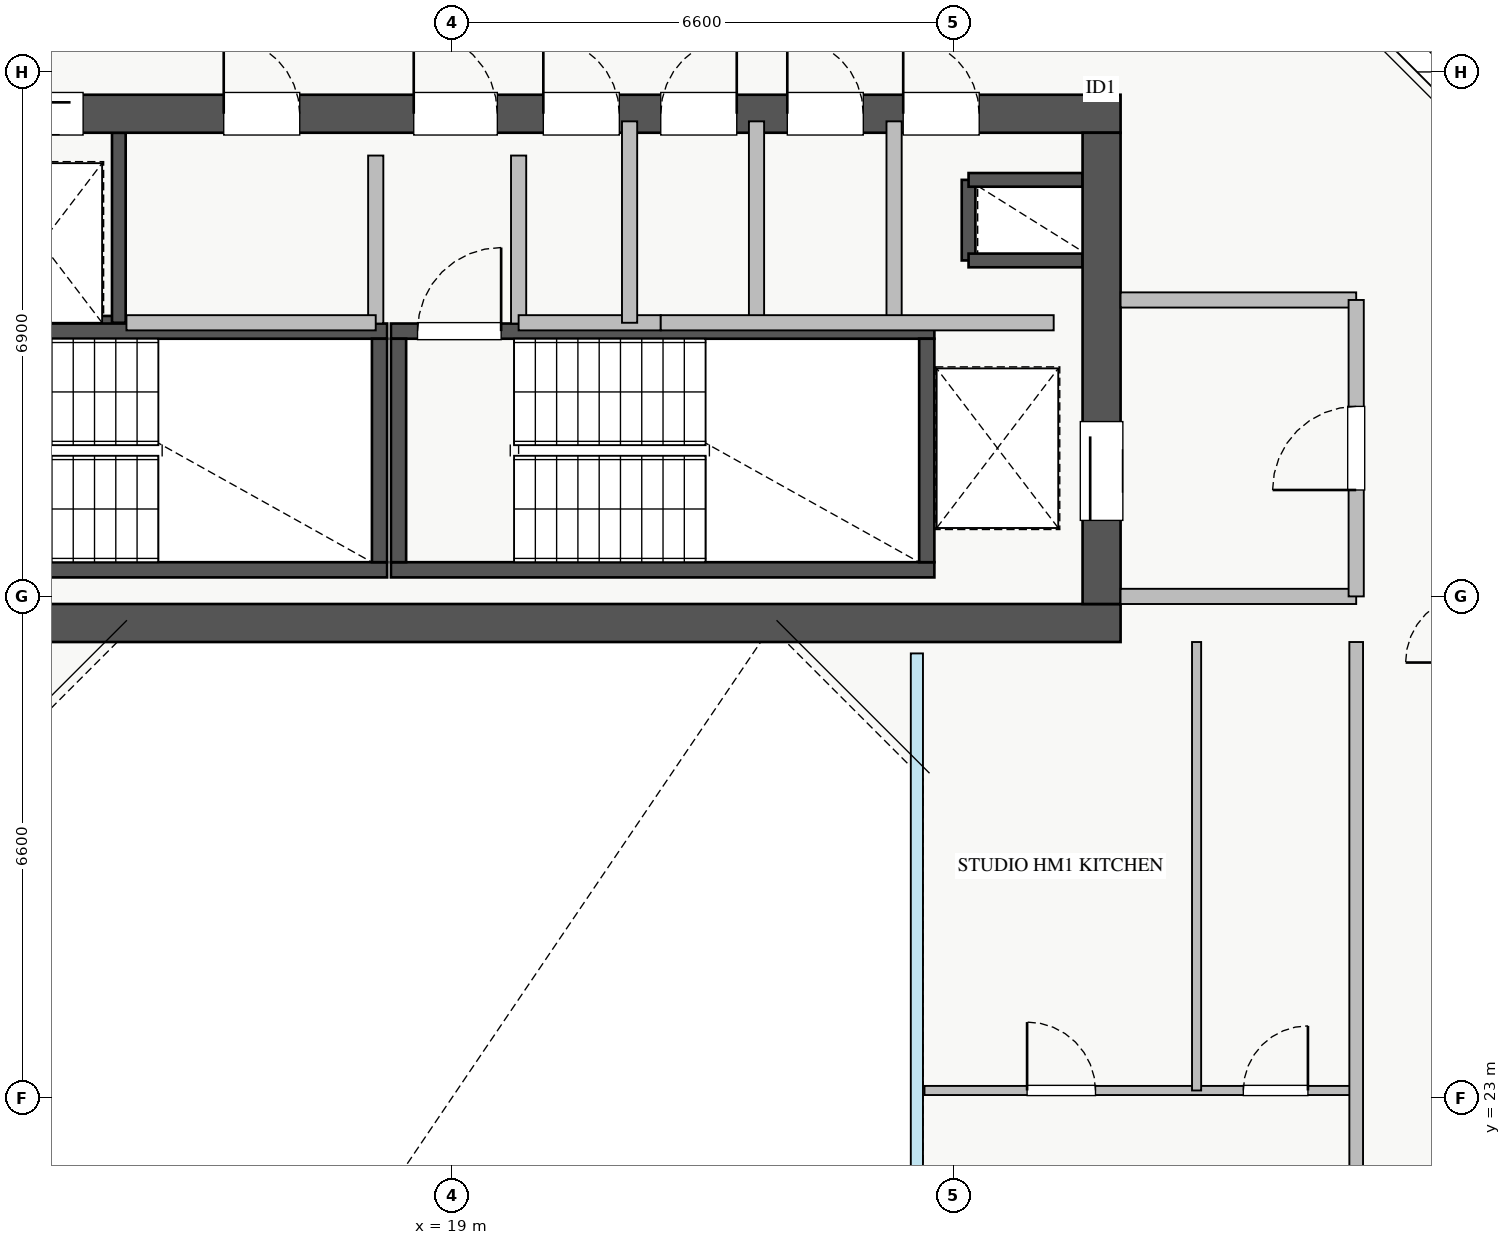
"""IFC4 building model, lengths in metres.
Left out: names, types, materials, properties, quantities, classifications, styles, units other than length and angle.
Written with IfcOpenShell. Run it as: python <this file> out.ifc"""

import sys

from ifc_helpers import new_model, si_unit, direction, frame, frame_2d, origin, place, context, subcontext, project, spatial, rectangle, extrude, source, transform, mapped, element, fill, save


model = new_model("IFC4")
c1 = context("Model", 3, precision=1e-05, world=origin(), true_north=direction((0.0, 1.0)))
c2 = subcontext(c1, "Body", "Model", "MODEL_VIEW")
j1 = project(units=[si_unit("LENGTHUNIT", "METRE"), si_unit("PLANEANGLEUNIT", "RADIAN")], contexts=[c1])
p1 = place(None, origin())
s1 = spatial("IfcSite", under=j1, at=p1, CompositionType="ELEMENT")
p2 = place(p1, origin())
s2 = spatial("IfcBuilding", under=s1, at=p2, CompositionType="ELEMENT")
p3 = place(p2, frame((0.0, 0.0, 193.75)))
s3 = spatial("IfcBuildingStorey", under=s2, at=p3, CompositionType="ELEMENT", Elevation=193.75)
p4 = place(p3, frame((12.68, 33.2, 0.0), z_axis=(0.0, 0.0, 1.0), x_axis=(1.0, 0.0, 0.0)))
e1 = element("IfcWall", 1, at=p4, inside=s3, PredefinedType="SHEAR", context=c2, shape_type="SweptSolid", body=[
    extrude(rectangle(XDim=1.94, YDim=0.18, at=frame_2d((0.97, 0.0))), origin(), (0.0, 0.0, 1.0), 3.07),
])
p5 = place(p3, frame((14.62, 33.2, 0.0), z_axis=(0.0, 0.0, 1.0), x_axis=(0.0, 1.0, 0.0)))
e2 = element("IfcWall", 2, at=p5, inside=s3, PredefinedType="SHEAR", context=c2, shape_type="SweptSolid", body=[
    extrude(rectangle(XDim=2.5, YDim=0.18, at=frame_2d((1.25, 0.0))), origin(), (0.0, 0.0, 1.0), 3.07),
])
p6 = place(p3, frame((25.8, 34.02, 0.0), z_axis=(0.0, 0.0, 1.0), x_axis=(0.0, 1.0, 0.0)))
e3 = element("IfcWall", 3, at=p6, inside=s3, PredefinedType="SHEAR", context=c2, shape_type="SweptSolid", body=[
    extrude(rectangle(XDim=1.06, YDim=0.18, at=frame_2d((0.53, 0.0))), origin(), (0.0, 0.0, 1.0), 3.07),
])
for number, where, z_axis, x_axis in (
    (4, (25.8, 35.08, 0.0), (0.0, 0.0, 1.0), (1.0, 0.0, 0.0)),
    (5, (25.8, 34.02, 0.0), (0.0, 0.0, 1.0), (1.0, 0.0, 0.0)),
):
    element("IfcWall", number, at=place(p3, frame(where, z_axis=z_axis, x_axis=x_axis)), inside=s3, PredefinedType="SHEAR", context=c2, shape_type="SweptSolid", body=[
        extrude(rectangle(XDim=1.5, YDim=0.18, at=frame_2d((0.75, 0.0))), origin(), (0.0, 0.0, 1.0), 3.07),
    ])
p7 = place(p3, frame((10.7, 29.95, 0.0), z_axis=(0.0, 0.0, 1.0), x_axis=(1.0, 0.0, 0.0)))
e6 = element("IfcWall", 6, at=p7, inside=s3, PredefinedType="SHEAR", context=c2, shape_type="SweptSolid", body=[
    extrude(rectangle(XDim=7.45, YDim=0.2, at=frame_2d((3.725, 0.0))), origin(), (0.0, 0.0, 1.0), 3.25),
])
p8 = place(p3, frame((10.7, 33.09, 0.0), z_axis=(0.0, 0.0, 1.0), x_axis=(1.0, 0.0, 0.0)))
e7 = element("IfcWall", 7, at=p8, inside=s3, PredefinedType="SHEAR", context=c2, shape_type="SweptSolid", body=[
    extrude(rectangle(XDim=7.45, YDim=0.2, at=frame_2d((3.725, 0.0))), origin(), (0.0, 0.0, 1.0), 3.25),
])
p9 = place(p8, frame((0.35, 0.0, 0.0)))
e8 = element("IfcOpeningElement", 8, at=p9, cuts=e7, PredefinedType="OPENING", context=c2, shape_type="SweptSolid", body=[
    extrude(rectangle(XDim=1.1, YDim=2.05, at=frame_2d((0.55, 1.025))), frame((0.0, 0.11, 0.0), z_axis=(0.0, -1.0, 0.0), x_axis=(1.0, 0.0, 0.0)), (0.0, 0.0, 1.0), 0.22),
])
p10 = place(p3, frame((18.05, 30.05, 0.0), z_axis=(0.0, 0.0, 1.0), x_axis=(0.0, 1.0, 0.0)))
e9 = element("IfcWall", 9, at=p10, inside=s3, PredefinedType="SHEAR", context=c2, shape_type="SweptSolid", body=[
    extrude(rectangle(XDim=2.94, YDim=0.2, at=frame_2d((1.47, 0.0))), origin(), (0.0, 0.0, 1.0), 3.25),
])
p11 = place(p3, frame((18.2, 29.95, 0.0), z_axis=(0.0, 0.0, 1.0), x_axis=(1.0, 0.0, 0.0)))
e10 = element("IfcWall", 10, at=p11, inside=s3, PredefinedType="SHEAR", context=c2, shape_type="SweptSolid", body=[
    extrude(rectangle(XDim=7.15, YDim=0.2, at=frame_2d((3.575, 0.0))), origin(), (0.0, 0.0, 1.0), 3.25),
])
p12 = place(p3, frame((18.2, 33.09, 0.0), z_axis=(0.0, 0.0, 1.0), x_axis=(1.0, 0.0, 0.0)))
e11 = element("IfcWall", 11, at=p12, inside=s3, PredefinedType="SHEAR", context=c2, shape_type="SweptSolid", body=[
    extrude(rectangle(XDim=7.15, YDim=0.2, at=frame_2d((3.575, 0.0))), origin(), (0.0, 0.0, 1.0), 3.25),
])
p13 = place(p12, frame((0.35, 0.0, 0.0)))
e12 = element("IfcOpeningElement", 12, at=p13, cuts=e11, PredefinedType="OPENING", context=c2, shape_type="SweptSolid", body=[
    extrude(rectangle(XDim=1.1, YDim=2.05, at=frame_2d((0.55, 1.025))), frame((0.0, 0.11, 0.0), z_axis=(0.0, -1.0, 0.0), x_axis=(1.0, 0.0, 0.0)), (0.0, 0.0, 1.0), 0.22),
])
for number, where, z_axis, x_axis in (
    (13, (18.3, 30.05, 0.0), (0.0, 0.0, 1.0), (0.0, 1.0, 0.0)),
    (14, (25.25, 30.05, 0.0), (0.0, 0.0, 1.0), (0.0, 1.0, 0.0)),
):
    element("IfcWall", number, at=place(p3, frame(where, z_axis=z_axis, x_axis=x_axis)), inside=s3, PredefinedType="SHEAR", context=c2, shape_type="SweptSolid", body=[
        extrude(rectangle(XDim=2.94, YDim=0.2, at=frame_2d((1.47, 0.0))), origin(), (0.0, 0.0, 1.0), 3.25),
    ])
p14 = place(p3, frame((10.2, 29.25, 0.0), z_axis=(0.0, 0.0, 1.0), x_axis=(1.0, 0.0, 0.0)))
e15 = element("IfcWall", 15, at=p14, inside=s3, PredefinedType="SHEAR", context=c2, shape_type="SweptSolid", body=[
    extrude(rectangle(XDim=17.6, YDim=0.5, at=frame_2d((8.8, 0.0))), origin(), (0.0, 0.0, 1.0), 3.25),
])
p15 = place(p3, frame((10.2, 35.95, 0.0), z_axis=(0.0, 0.0, 1.0), x_axis=(1.0, 0.0, 0.0)))
e16 = element("IfcWall", 16, at=p15, inside=s3, PredefinedType="SHEAR", context=c2, shape_type="SweptSolid", body=[
    extrude(rectangle(XDim=17.6, YDim=0.5, at=frame_2d((8.8, 0.0))), origin(), (0.0, 0.0, 1.0), 3.25),
])
p16 = place(p15, frame((1.15, 0.0, 0.0)))
e17 = element("IfcOpeningElement", 17, at=p16, cuts=e16, PredefinedType="OPENING", context=c2, shape_type="SweptSolid", body=[
    extrude(rectangle(XDim=1.1, YDim=2.05, at=frame_2d((0.55, 1.025))), frame((0.0, 0.26, 0.0), z_axis=(0.0, -1.0, 0.0), x_axis=(1.0, 0.0, 0.0)), (0.0, 0.0, 1.0), 0.52),
])
p17 = place(p15, frame((8.3, 0.0, 0.0)))
e18 = element("IfcOpeningElement", 18, at=p17, cuts=e16, PredefinedType="OPENING", context=c2, shape_type="SweptSolid", body=[
    extrude(rectangle(XDim=1.1, YDim=2.05, at=frame_2d((0.55, 1.025))), frame((0.0, 0.26, 0.0), z_axis=(0.0, -1.0, 0.0), x_axis=(1.0, 0.0, 0.0)), (0.0, 0.0, 1.0), 0.52),
])
p18 = place(p15, frame((2.85, 0.0, 0.0)))
e19 = element("IfcOpeningElement", 19, at=p18, cuts=e16, PredefinedType="OPENING", context=c2, shape_type="SweptSolid", body=[
    extrude(rectangle(XDim=1.1, YDim=2.05, at=frame_2d((0.55, 1.025))), frame((0.0, 0.26, 0.0), z_axis=(0.0, -1.0, 0.0), x_axis=(1.0, 0.0, 0.0)), (0.0, 0.0, 1.0), 0.52),
])
p19 = place(p15, frame((5.8, 0.0, 0.0)))
e20 = element("IfcOpeningElement", 20, at=p19, cuts=e16, PredefinedType="OPENING", context=c2, shape_type="SweptSolid", body=[
    extrude(rectangle(XDim=1.0, YDim=2.05, at=frame_2d((0.5, 1.025))), frame((0.0, 0.26, 0.0), z_axis=(0.0, -1.0, 0.0), x_axis=(1.0, 0.0, 0.0)), (0.0, 0.0, 1.0), 0.52),
])
p20 = place(p15, frame((14.74, 0.0, 0.0)))
e21 = element("IfcOpeningElement", 21, at=p20, cuts=e16, PredefinedType="OPENING", context=c2, shape_type="SweptSolid", body=[
    extrude(rectangle(XDim=1.0, YDim=2.05, at=frame_2d((0.5, 1.025))), frame((0.0, 0.26, 0.0), z_axis=(0.0, -1.0, 0.0), x_axis=(1.0, 0.0, 0.0)), (0.0, 0.0, 1.0), 0.52),
])
p21 = place(p15, frame((10.005, 0.0, 0.0)))
e22 = element("IfcOpeningElement", 22, at=p21, cuts=e16, PredefinedType="OPENING", context=c2, shape_type="SweptSolid", body=[
    extrude(rectangle(XDim=1.0, YDim=2.05, at=frame_2d((0.5, 1.025))), frame((0.0, 0.26, 0.0), z_axis=(0.0, -1.0, 0.0), x_axis=(1.0, 0.0, 0.0)), (0.0, 0.0, 1.0), 0.52),
])
p22 = place(p15, frame((11.55, 0.0, 0.0)))
e23 = element("IfcOpeningElement", 23, at=p22, cuts=e16, PredefinedType="OPENING", context=c2, shape_type="SweptSolid", body=[
    extrude(rectangle(XDim=1.0, YDim=2.05, at=frame_2d((0.5, 1.025))), frame((0.0, 0.26, 0.0), z_axis=(0.0, -1.0, 0.0), x_axis=(1.0, 0.0, 0.0)), (0.0, 0.0, 1.0), 0.52),
])
p23 = place(p15, frame((13.215, 0.0, 0.0)))
e24 = element("IfcOpeningElement", 24, at=p23, cuts=e16, PredefinedType="OPENING", context=c2, shape_type="SweptSolid", body=[
    extrude(rectangle(XDim=1.0, YDim=2.05, at=frame_2d((0.5, 1.025))), frame((0.0, 0.26, 0.0), z_axis=(0.0, -1.0, 0.0), x_axis=(1.0, 0.0, 0.0)), (0.0, 0.0, 1.0), 0.52),
])
p24 = place(p3, frame((27.55, 29.5, 0.0), z_axis=(0.0, 0.0, 1.0), x_axis=(0.0, 1.0, 0.0)))
e25 = element("IfcWall", 25, at=p24, inside=s3, PredefinedType="SHEAR", context=c2, shape_type="SweptSolid", body=[
    extrude(rectangle(XDim=6.2, YDim=0.5, at=frame_2d((3.1, 0.0))), origin(), (0.0, 0.0, 1.0), 3.25),
])
p25 = place(p24, frame((1.1, 0.0, 0.0)))
e26 = element("IfcOpeningElement", 26, at=p25, cuts=e25, PredefinedType="OPENING", context=c2, shape_type="SweptSolid", body=[
    extrude(rectangle(XDim=1.3, YDim=2.05, at=frame_2d((0.65, 1.025))), frame((0.0, 0.26, 0.0), z_axis=(0.0, -1.0, 0.0), x_axis=(1.0, 0.0, 0.0)), (0.0, 0.0, 1.0), 0.52),
])
p26 = place(p3, frame((27.8, 29.6, 0.0), z_axis=(0.0, 0.0, 1.0), x_axis=(1.0, 0.0, 0.0)))
e27 = element("IfcWall", 27, at=p26, inside=s3, PredefinedType="PARTITIONING", context=c2, shape_type="SweptSolid", body=[
    extrude(rectangle(XDim=3.1, YDim=0.2, at=frame_2d((1.55, 0.0))), origin(), (0.0, 0.0, 1.0), 3.07),
])
p27 = place(p3, frame((27.8, 33.5, 0.0), z_axis=(0.0, 0.0, 1.0), x_axis=(1.0, 0.0, 0.0)))
e28 = element("IfcWall", 28, at=p27, inside=s3, PredefinedType="PARTITIONING", context=c2, shape_type="SweptSolid", body=[
    extrude(rectangle(XDim=3.1, YDim=0.2, at=frame_2d((1.55, 0.0))), origin(), (0.0, 0.0, 1.0), 2.265),
])
p28 = place(p3, frame((30.9, 29.6, 0.0), z_axis=(0.0, 0.0, 1.0), x_axis=(0.0, 1.0, 0.0)))
e29 = element("IfcWall", 29, at=p28, inside=s3, PredefinedType="PARTITIONING", context=c2, shape_type="SweptSolid", body=[
    extrude(rectangle(XDim=3.9, YDim=0.2, at=frame_2d((1.95, 0.0))), origin(), (0.0, 0.0, 1.0), 3.07),
])
p29 = place(p28, frame((1.4, 0.0, 0.0)))
e30 = element("IfcOpeningElement", 30, at=p29, cuts=e29, PredefinedType="OPENING", context=c2, shape_type="SweptSolid", body=[
    extrude(rectangle(XDim=1.1, YDim=2.05, at=frame_2d((0.55, 1.025))), frame((0.0, 0.11, 0.0), z_axis=(0.0, -1.0, 0.0), x_axis=(1.0, 0.0, 0.0)), (0.0, 0.0, 1.0), 0.22),
])
for number, where, z_axis, x_axis in (
    (31, (18.0, 33.19, 0.0), (0.0, 0.0, 1.0), (0.0, 1.0, 0.0)),
    (32, (19.88, 33.19, 0.0), (0.0, 0.0, 1.0), (0.0, 1.0, 0.0)),
):
    element("IfcWall", number, at=place(p3, frame(where, z_axis=z_axis, x_axis=x_axis)), inside=s3, PredefinedType="PARTITIONING", context=c2, shape_type="SweptSolid", body=[
        extrude(rectangle(XDim=2.21, YDim=0.2, at=frame_2d((1.105, 0.0))), origin(), (0.0, 0.0, 1.0), 3.07),
    ])
p30 = place(p3, frame((14.72, 33.2, 0.0), z_axis=(0.0, 0.0, 1.0), x_axis=(1.0, 0.0, 0.0)))
e33 = element("IfcWall", 33, at=p30, inside=s3, PredefinedType="PARTITIONING", context=c2, shape_type="SweptSolid", body=[
    extrude(rectangle(XDim=3.28, YDim=0.2, at=frame_2d((1.64, 0.0))), origin(), (0.0, 0.0, 1.0), 3.07),
])
p31 = place(p3, frame((24.82, 33.2, 0.0), z_axis=(0.0, 0.0, 1.0), x_axis=(0.0, 1.0, 0.0)))
e34 = element("IfcWall", 34, at=p31, inside=s3, PredefinedType="PARTITIONING", context=c2, shape_type="SweptSolid", body=[
    extrude(rectangle(XDim=2.65, YDim=0.2, at=frame_2d((1.325, 0.0))), origin(), (0.0, 0.0, 1.0), 3.07),
])
p32 = place(p3, frame((19.88, 33.2, 0.0), z_axis=(0.0, 0.0, 1.0), x_axis=(1.0, 0.0, 0.0)))
e35 = element("IfcWall", 35, at=p32, inside=s3, PredefinedType="PARTITIONING", context=c2, shape_type="SweptSolid", body=[
    extrude(rectangle(XDim=1.87, YDim=0.2, at=frame_2d((0.935, 0.0))), origin(), (0.0, 0.0, 1.0), 3.07),
])
for number, where, z_axis, x_axis in (
    (36, (21.34, 33.2, 0.0), (0.0, 0.0, 1.0), (0.0, 1.0, 0.0)),
    (37, (23.01, 33.2, 0.0), (0.0, 0.0, 1.0), (0.0, 1.0, 0.0)),
):
    element("IfcWall", number, at=place(p3, frame(where, z_axis=z_axis, x_axis=x_axis)), inside=s3, PredefinedType="PARTITIONING", context=c2, shape_type="SweptSolid", body=[
        extrude(rectangle(XDim=2.65, YDim=0.2, at=frame_2d((1.325, 0.0))), origin(), (0.0, 0.0, 1.0), 3.07),
    ])
p33 = place(p3, frame((21.75, 33.2, 0.0), z_axis=(0.0, 0.0, 1.0), x_axis=(1.0, 0.0, 0.0)))
e38 = element("IfcWall", 38, at=p33, inside=s3, PredefinedType="PARTITIONING", context=c2, shape_type="SweptSolid", body=[
    extrude(rectangle(XDim=5.17, YDim=0.2, at=frame_2d((2.585, 0.0))), origin(), (0.0, 0.0, 1.0), 3.07),
])
p34 = place(p3, frame((25.22, 23.1, 0.0), z_axis=(0.0, 0.0, 1.0), x_axis=(1.0, 0.0, 0.0)))
e39 = element("IfcWall", 39, at=p34, inside=s3, PredefinedType="PLUMBINGWALL", context=c2, shape_type="SweptSolid", body=[
    extrude(rectangle(XDim=5.68, YDim=0.12, at=frame_2d((2.84, 0.0))), origin(), (0.0, 0.0, 1.0), 3.07),
])
p35 = place(p34, frame((1.35, 0.0, 0.0)))
e40 = element("IfcOpeningElement", 40, at=p35, cuts=e39, PredefinedType="OPENING", context=c2, shape_type="SweptSolid", body=[
    extrude(rectangle(XDim=0.9, YDim=2.05, at=frame_2d((0.45, 1.025))), frame((0.0, 0.07, 0.0), z_axis=(0.0, -1.0, 0.0), x_axis=(1.0, 0.0, 0.0)), (0.0, 0.0, 1.0), 0.14),
])
p36 = place(p34, frame((4.195, 0.0, 0.0)))
e41 = element("IfcOpeningElement", 41, at=p36, cuts=e39, PredefinedType="OPENING", context=c2, shape_type="SweptSolid", body=[
    extrude(rectangle(XDim=0.85, YDim=2.05, at=frame_2d((0.425, 1.025))), frame((0.0, 0.07, 0.0), z_axis=(0.0, -1.0, 0.0), x_axis=(1.0, 0.0, 0.0)), (0.0, 0.0, 1.0), 0.14),
])
p37 = place(p3, frame((28.8, 23.1, 0.0), z_axis=(0.0, 0.0, 1.0), x_axis=(0.0, 1.0, 0.0)))
e42 = element("IfcWall", 42, at=p37, inside=s3, PredefinedType="PLUMBINGWALL", context=c2, shape_type="SweptSolid", body=[
    extrude(rectangle(XDim=5.9, YDim=0.12, at=frame_2d((2.95, 0.0))), origin(), (0.0, 0.0, 1.0), 3.07),
])
p38 = place(p3, frame((30.9, 17.0, 0.0), z_axis=(0.0, 0.0, 1.0), x_axis=(0.0, 1.0, 0.0)))
e43 = element("IfcWall", 43, at=p38, inside=s3, PredefinedType="PARTITIONING", context=c2, shape_type="SweptSolid", body=[
    extrude(rectangle(XDim=12.0, YDim=0.18, at=frame_2d((6.0, 0.0))), origin(), (0.0, 0.0, 1.0), 3.07),
])
p39 = place(p38, frame((2.36, 0.0, 0.0)))
e44 = element("IfcOpeningElement", 44, at=p39, cuts=e43, PredefinedType="OPENING", context=c2, shape_type="SweptSolid", body=[
    extrude(rectangle(XDim=1.0, YDim=2.05, at=frame_2d((0.5, 1.025))), frame((0.0, 0.1, 0.0), z_axis=(0.0, -1.0, 0.0), x_axis=(1.0, 0.0, 0.0)), (0.0, 0.0, 1.0), 0.2),
])
m1 = source(origin(), c2, "Body", "SweptSolid", [
    extrude(rectangle(XDim=1.3, YDim=2.05, at=frame_2d((0.65, 1.025))), frame((0.0, 0.025, 0.0), z_axis=(0.0, -1.0, 0.0), x_axis=(1.0, 0.0, 0.0)), (0.0, 0.0, 1.0), 0.05),
])
p40 = place(p25, origin())
e45 = element("IfcDoor", 45, at=p40, inside=s3, OperationType="SLIDING_TO_LEFT", PredefinedType="DOOR", context=c2, shape_type="MappedRepresentation", body=[
    mapped(m1, transform((0.0, 0.0, 0.0), x_axis=(1.0, 0.0, 0.0), y_axis=(0.0, 1.0, 0.0), z_axis=(0.0, 0.0, 1.0), scale=1.0)),
])
fill(e26, e45)
m2 = source(origin(), c2, "Body", "SweptSolid", [
    extrude(rectangle(XDim=1.1, YDim=2.05, at=frame_2d((0.55, 1.025))), frame((0.0, 0.025, 0.0), z_axis=(0.0, -1.0, 0.0), x_axis=(1.0, 0.0, 0.0)), (0.0, 0.0, 1.0), 0.05),
])
p41 = place(p17, origin())
e46 = element("IfcDoor", 46, at=p41, inside=s3, OperationType="SINGLE_SWING_LEFT", PredefinedType="DOOR", context=c2, shape_type="MappedRepresentation", body=[
    mapped(m2, transform((0.0, 0.0, 0.0), x_axis=(1.0, 0.0, 0.0), y_axis=(0.0, 1.0, 0.0), z_axis=(0.0, 0.0, 1.0), scale=1.0)),
])
fill(e18, e46)
p42 = place(p13, origin())
e47 = element("IfcDoor", 47, at=p42, inside=s3, OperationType="SINGLE_SWING_RIGHT", PredefinedType="DOOR", context=c2, shape_type="MappedRepresentation", body=[
    mapped(m2, transform((0.0, 0.0, 0.0), x_axis=(1.0, 0.0, 0.0), y_axis=(0.0, 1.0, 0.0), z_axis=(0.0, 0.0, 1.0), scale=1.0)),
])
fill(e12, e47)
p43 = place(p18, origin())
e48 = element("IfcDoor", 48, at=p43, inside=s3, OperationType="SLIDING_TO_LEFT", PredefinedType="DOOR", context=c2, shape_type="MappedRepresentation", body=[
    mapped(m2, transform((0.0, 0.0, 0.0), x_axis=(1.0, 0.0, 0.0), y_axis=(0.0, 1.0, 0.0), z_axis=(0.0, 0.0, 1.0), scale=1.0)),
])
fill(e19, e48)
m3 = source(origin(), c2, "Body", "SweptSolid", [
    extrude(rectangle(XDim=1.0, YDim=2.05, at=frame_2d((0.5, 1.025))), frame((0.0, 0.025, 0.0), z_axis=(0.0, -1.0, 0.0), x_axis=(1.0, 0.0, 0.0)), (0.0, 0.0, 1.0), 0.05),
])
p44 = place(p19, origin())
e49 = element("IfcDoor", 49, at=p44, inside=s3, OperationType="SINGLE_SWING_LEFT", PredefinedType="DOOR", context=c2, shape_type="MappedRepresentation", body=[
    mapped(m3, transform((0.0, 0.0, 0.0), x_axis=(1.0, 0.0, 0.0), y_axis=(0.0, 1.0, 0.0), z_axis=(0.0, 0.0, 1.0), scale=1.0)),
])
fill(e20, e49)
p45 = place(p20, origin())
e50 = element("IfcDoor", 50, at=p45, inside=s3, OperationType="SINGLE_SWING_LEFT", PredefinedType="DOOR", context=c2, shape_type="MappedRepresentation", body=[
    mapped(m3, transform((0.0, 0.0, 0.0), x_axis=(1.0, 0.0, 0.0), y_axis=(0.0, 1.0, 0.0), z_axis=(0.0, 0.0, 1.0), scale=1.0)),
])
fill(e21, e50)
p46 = place(p21, origin())
e51 = element("IfcDoor", 51, at=p46, inside=s3, OperationType="SINGLE_SWING_LEFT", PredefinedType="DOOR", context=c2, shape_type="MappedRepresentation", body=[
    mapped(m3, transform((0.0, 0.0, 0.0), x_axis=(1.0, 0.0, 0.0), y_axis=(0.0, 1.0, 0.0), z_axis=(0.0, 0.0, 1.0), scale=1.0)),
])
fill(e22, e51)
p47 = place(p22, origin())
e52 = element("IfcDoor", 52, at=p47, inside=s3, OperationType="SINGLE_SWING_RIGHT", PredefinedType="DOOR", context=c2, shape_type="MappedRepresentation", body=[
    mapped(m3, transform((0.0, 0.0, 0.0), x_axis=(1.0, 0.0, 0.0), y_axis=(0.0, 1.0, 0.0), z_axis=(0.0, 0.0, 1.0), scale=1.0)),
])
fill(e23, e52)
p48 = place(p23, origin())
e53 = element("IfcDoor", 53, at=p48, inside=s3, OperationType="SINGLE_SWING_LEFT", PredefinedType="DOOR", context=c2, shape_type="MappedRepresentation", body=[
    mapped(m3, transform((0.0, 0.0, 0.0), x_axis=(1.0, 0.0, 0.0), y_axis=(0.0, 1.0, 0.0), z_axis=(0.0, 0.0, 1.0), scale=1.0)),
])
fill(e24, e53)
p49 = place(p29, origin())
e54 = element("IfcDoor", 54, at=p49, inside=s3, OperationType="SINGLE_SWING_LEFT", PredefinedType="DOOR", context=c2, shape_type="MappedRepresentation", body=[
    mapped(m2, transform((0.0, 0.0, 0.0), x_axis=(1.0, 0.0, 0.0), y_axis=(0.0, 1.0, 0.0), z_axis=(0.0, 0.0, 1.0), scale=1.0)),
])
fill(e30, e54)
m4 = source(origin(), c2, "Body", "SweptSolid", [
    extrude(rectangle(XDim=0.9, YDim=2.05, at=frame_2d((0.45, 1.025))), frame((0.0, 0.025, 0.0), z_axis=(0.0, -1.0, 0.0), x_axis=(1.0, 0.0, 0.0)), (0.0, 0.0, 1.0), 0.05),
])
p50 = place(p35, origin())
e55 = element("IfcDoor", 55, at=p50, inside=s3, OperationType="SINGLE_SWING_LEFT", PredefinedType="DOOR", context=c2, shape_type="MappedRepresentation", body=[
    mapped(m4, transform((0.0, 0.0, 0.0), x_axis=(1.0, 0.0, 0.0), y_axis=(0.0, 1.0, 0.0), z_axis=(0.0, 0.0, 1.0), scale=1.0)),
])
fill(e40, e55)
m5 = source(origin(), c2, "Body", "SweptSolid", [
    extrude(rectangle(XDim=0.85, YDim=2.05, at=frame_2d((0.425, 1.025))), frame((0.0, 0.025, 0.0), z_axis=(0.0, -1.0, 0.0), x_axis=(1.0, 0.0, 0.0)), (0.0, 0.0, 1.0), 0.05),
])
p51 = place(p36, origin())
e56 = element("IfcDoor", 56, at=p51, inside=s3, OperationType="SINGLE_SWING_RIGHT", PredefinedType="DOOR", context=c2, shape_type="MappedRepresentation", body=[
    mapped(m5, transform((0.0, 0.0, 0.0), x_axis=(1.0, 0.0, 0.0), y_axis=(0.0, 1.0, 0.0), z_axis=(0.0, 0.0, 1.0), scale=1.0)),
])
fill(e41, e56)
save(model, sys.argv[1])
